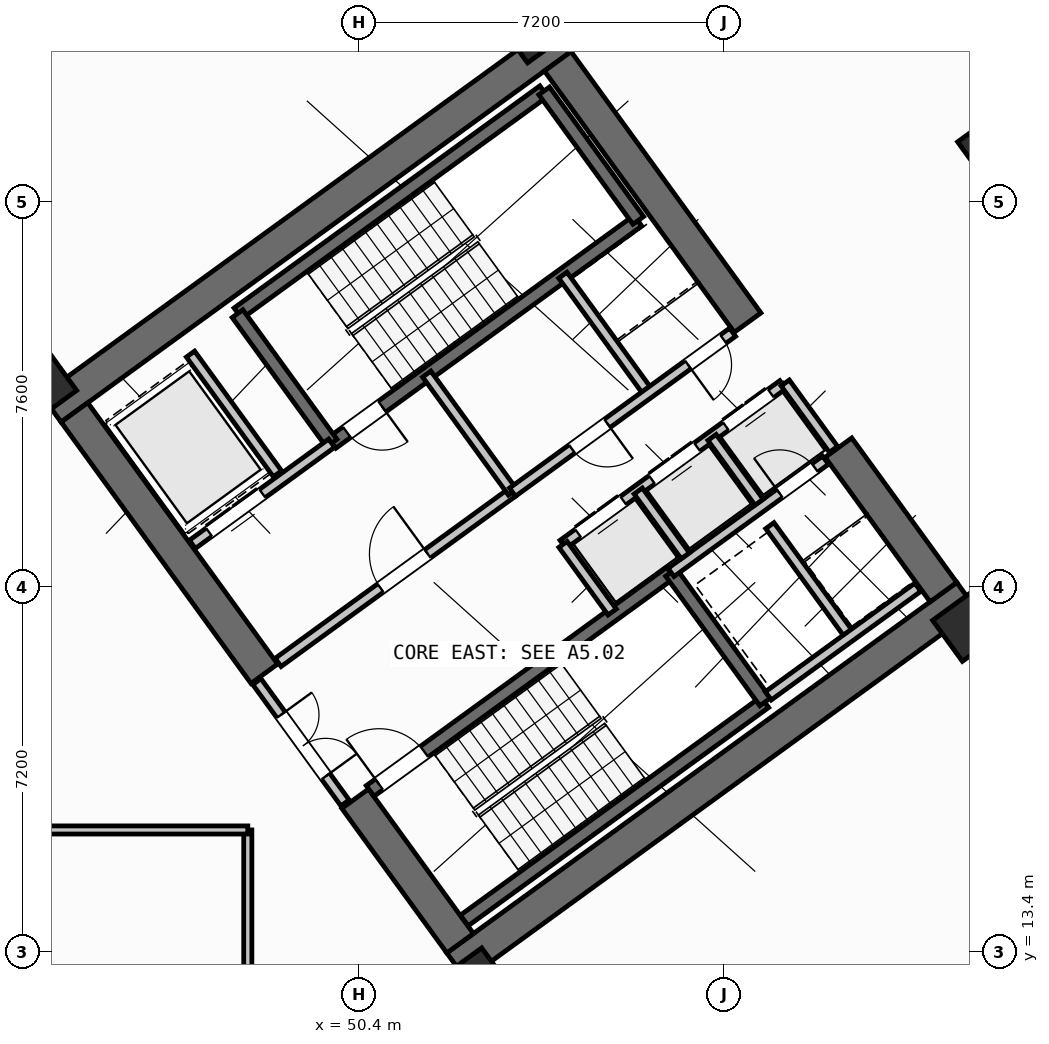
"""IFC4 building model, lengths in metres.
Left out: names, types, materials, properties, quantities, classifications, styles, units other than length and angle.
Written with IfcOpenShell. Run it as: python <this file> out.ifc"""

import sys

from ifc_helpers import new_model, si_unit, direction, frame, frame_2d, origin, origin_2d, place, context, subcontext, project, spatial, rectangle, hollow_rectangle, extrude, source, transform, mapped, element, fill, save


model = new_model("IFC4")
c1 = context("Model", 3, precision=1e-05, world=origin(), true_north=direction((0.0, 1.0)))
c2 = subcontext(c1, "Body", "Model", "MODEL_VIEW")
j1 = project(units=[si_unit("LENGTHUNIT", "METRE"), si_unit("PLANEANGLEUNIT", "RADIAN")], contexts=[c1])
p1 = place(None, origin())
s1 = spatial("IfcSite", under=j1, at=p1, CompositionType="ELEMENT")
p2 = place(p1, origin())
s2 = spatial("IfcBuilding", under=s1, at=p2, CompositionType="ELEMENT")
p3 = place(p2, frame((0.0, 0.0, 10.2)))
s3 = spatial("IfcBuildingStorey", under=s2, at=p3, CompositionType="ELEMENT", Elevation=10.2)
p4 = place(p3, frame((52.318, 13.11, 0.0), z_axis=(0.0, 0.0, 1.0), x_axis=(0.809019445368, 0.587781878776, 0.0)))
e1 = element("IfcWall", 1, at=p4, inside=s3, PredefinedType="SHEAR", context=c2, shape_type="SweptSolid", body=[
    extrude(rectangle(XDim=12.44, YDim=0.65, at=frame_2d((6.22, 0.0))), origin(), (0.0, 0.0, 1.0), 3.85),
])
p5 = place(p3, frame((44.325, 24.113, 0.0), z_axis=(0.0, 0.0, 1.0), x_axis=(0.809012664862, 0.58779121131, 0.0)))
e2 = element("IfcWall", 2, at=p5, inside=s3, PredefinedType="SHEAR", context=c2, shape_type="SweptSolid", body=[
    extrude(rectangle(XDim=12.44, YDim=0.65, at=frame_2d((6.22, 0.0))), origin(), (0.0, 0.0, 1.0), 3.85),
])
p6 = place(p3, frame((52.39, 13.564, 0.0), z_axis=(0.0, 0.0, 1.0), x_axis=(-0.58779688989, 0.809008539037, 0.0)))
e3 = element("IfcWall", 3, at=p6, inside=s3, PredefinedType="SHEAR", context=c2, shape_type="SweptSolid", body=[
    extrude(rectangle(XDim=3.525, YDim=0.65, at=frame_2d((1.763, 0.0))), origin(), (0.0, 0.0, 1.0), 3.85),
])
p7 = place(p3, frame((48.526, 18.884, 0.0), z_axis=(0.0, 0.0, 1.0), x_axis=(-0.58777996584, 0.809020835181, 0.0)))
e4 = element("IfcWall", 4, at=p7, inside=s3, PredefinedType="SHEAR", context=c2, shape_type="SweptSolid", body=[
    extrude(rectangle(XDim=6.375, YDim=0.65, at=frame_2d((3.188, 0.0))), origin(), (0.0, 0.0, 1.0), 3.85),
])
p8 = place(p3, frame((61.929, 20.494, 0.0), z_axis=(0.0, 0.0, 1.0), x_axis=(-0.58782982593, 0.808984607855, 0.0)))
e5 = element("IfcWall", 5, at=p8, inside=s3, PredefinedType="SHEAR", context=c2, shape_type="SweptSolid", body=[
    extrude(rectangle(XDim=3.525, YDim=0.65, at=frame_2d((1.762, 0.0))), origin(), (0.0, 0.0, 1.0), 3.85),
])
p9 = place(p3, frame((58.064, 25.813, 0.0), z_axis=(0.0, 0.0, 1.0), x_axis=(-0.58777996584, 0.809020835181, 0.0)))
e6 = element("IfcWall", 6, at=p9, inside=s3, PredefinedType="SHEAR", context=c2, shape_type="SweptSolid", body=[
    extrude(rectangle(XDim=6.375, YDim=0.65, at=frame_2d((3.188, 0.0))), origin(), (0.0, 0.0, 1.0), 3.85),
])
m1 = source(origin(), c2, "Body", "SweptSolid", [
    extrude(hollow_rectangle(XDim=1.1, YDim=1.1, WallThickness=0.04, at=origin_2d()), origin(), (0.0, 0.0, 1.0), 4.2),
])
p10 = place(p3, frame((62.977, 29.259, 0.0), z_axis=(0.0, 0.0, 1.0), x_axis=(0.809016994375, 0.587785252292, 0.0)))
e7 = element("IfcColumn", 7, at=p10, inside=s3, PredefinedType="COLUMN", context=c2, shape_type="MappedRepresentation", body=[
    mapped(m1, transform((0.0, 0.0, 0.0), scale=1.0)),
])
m2 = source(origin(), c2, "Body", "SweptSolid", [
    extrude(hollow_rectangle(XDim=1.0, YDim=1.0, WallThickness=0.04, at=origin_2d()), origin(), (0.0, 0.0, 1.0), 4.2),
])
for number, where, z_axis, x_axis in (
    (8, (52.705, 12.773, 0.0), (0.0, 0.0, 1.0), (0.809, 0.588, 0.0)),
    (9, (44.124, 24.585, 0.0), (0.0, 0.0, 1.0), (0.809, 0.588, 0.0)),
    (10, (62.414, 19.827, 0.0), (0.0, 0.0, 1.0), (0.809, 0.588, 0.0)),
    (11, (53.832, 31.638, 0.0), (0.0, 0.0, 1.0), (0.809, 0.588, 0.0)),
):
    element("IfcColumn", number, at=place(p3, frame(where, z_axis=z_axis, x_axis=x_axis)), inside=s3, PredefinedType="COLUMN", context=c2, shape_type="MappedRepresentation", body=[
        mapped(m2, transform((0.0, 0.0, 0.0), scale=1.0)),
    ])
p11 = place(p3, frame((48.006, 25.996, 0.0), z_axis=(0.0, 0.0, 1.0), x_axis=(0.80901903764, 0.587782439969, 0.0)))
e12 = element("IfcWall", 12, at=p11, inside=s3, PredefinedType="SHEAR", context=c2, shape_type="SweptSolid", body=[
    extrude(rectangle(XDim=7.46, YDim=0.26, at=frame_2d((3.73, 0.0))), origin(), (0.0, 0.0, 1.0), 3.85),
])
p12 = place(p3, frame((49.863, 23.44, 0.0), z_axis=(0.0, 0.0, 1.0), x_axis=(0.809003474932, 0.587803859759, 0.0)))
e13 = element("IfcWall", 13, at=p12, inside=s3, PredefinedType="SHEAR", context=c2, shape_type="SweptSolid", body=[
    extrude(rectangle(XDim=7.46, YDim=0.26, at=frame_2d((3.73, 0.0))), origin(), (0.0, 0.0, 1.0), 3.85),
])
p13 = place(p12, frame((0.36, 0.0, 0.0)))
e14 = element("IfcOpeningElement", 14, at=p13, cuts=e13, PredefinedType="OPENING", context=c2, shape_type="SweptSolid", body=[
    extrude(rectangle(XDim=0.86, YDim=2.05, at=frame_2d((0.43, 1.025))), frame((0.0, 0.14, 0.0), z_axis=(0.0, -1.0, 0.0), x_axis=(1.0, 0.0, 0.0)), (0.0, 0.0, 1.0), 0.28),
])
p14 = place(p3, frame((49.855, 23.434, 0.0), z_axis=(0.0, 0.0, 1.0), x_axis=(-0.58776738483, 0.809029975545, 0.0)))
e15 = element("IfcWall", 15, at=p14, inside=s3, PredefinedType="SHEAR", context=c2, shape_type="SweptSolid", body=[
    extrude(rectangle(XDim=3.16, YDim=0.26, at=frame_2d((1.58, 0.0))), origin(), (0.0, 0.0, 1.0), 3.85),
])
p15 = place(p3, frame((55.906, 27.831, 0.0), z_axis=(0.0, 0.0, 1.0), x_axis=(-0.587804123638, 0.809003283204, 0.0)))
e16 = element("IfcWall", 16, at=p15, inside=s3, PredefinedType="SHEAR", context=c2, shape_type="SweptSolid", body=[
    extrude(rectangle(XDim=3.16, YDim=0.26, at=frame_2d((1.58, 0.0))), origin(), (0.0, 0.0, 1.0), 3.85),
])
p16 = place(p3, frame((52.472, 14.013, 0.0), z_axis=(0.0, 0.0, 1.0), x_axis=(0.809028366311, 0.587769599847, 0.0)))
e17 = element("IfcWall", 17, at=p16, inside=s3, PredefinedType="SHEAR", context=c2, shape_type="SweptSolid", body=[
    extrude(rectangle(XDim=7.33, YDim=0.26, at=frame_2d((3.665, 0.0))), origin(), (0.0, 0.0, 1.0), 3.85),
])
p17 = place(p3, frame((50.615, 16.57, 0.0), z_axis=(0.0, 0.0, 1.0), x_axis=(0.809028366311, 0.587769599847, 0.0)))
e18 = element("IfcWall", 18, at=p17, inside=s3, PredefinedType="SHEAR", context=c2, shape_type="SweptSolid", body=[
    extrude(rectangle(XDim=7.33, YDim=0.26, at=frame_2d((3.665, 0.0))), origin(), (0.0, 0.0, 1.0), 3.85),
])
p18 = place(p17, frame((0.22, 0.0, 0.0)))
e19 = element("IfcOpeningElement", 19, at=p18, cuts=e18, PredefinedType="OPENING", context=c2, shape_type="SweptSolid", body=[
    extrude(rectangle(XDim=1.1, YDim=2.1, at=frame_2d((0.55, 1.05))), frame((0.0, 0.14, 0.0), z_axis=(0.0, -1.0, 0.0), x_axis=(1.0, 0.0, 0.0)), (0.0, 0.0, 1.0), 0.28),
])
p19 = place(p3, frame((58.41, 18.327, 0.0), z_axis=(0.0, 0.0, 1.0), x_axis=(-0.58776738483, 0.809029975545, 0.0)))
e20 = element("IfcWall", 20, at=p19, inside=s3, PredefinedType="SHEAR", context=c2, shape_type="SweptSolid", body=[
    extrude(rectangle(XDim=3.16, YDim=0.26, at=frame_2d((1.58, 0.0))), origin(), (0.0, 0.0, 1.0), 3.85),
])
p20 = place(p3, frame((47.106, 21.437, 0.0), z_axis=(0.0, 0.0, 1.0), x_axis=(0.809012514015, 0.58779141893, 0.0)))
e21 = element("IfcWall", 21, at=p20, inside=s3, PredefinedType="STANDARD", context=c2, shape_type="SweptSolid", body=[
    extrude(rectangle(XDim=3.398, YDim=0.2, at=frame_2d((1.699, 0.0))), origin(), (0.0, 0.0, 1.0), 3.84),
])
p21 = place(p20, frame((0.408, 0.0, 0.0)))
e22 = element("IfcOpeningElement", 22, at=p21, cuts=e21, PredefinedType="OPENING", context=c2, shape_type="SweptSolid", body=[
    extrude(rectangle(XDim=1.3, YDim=2.2, at=frame_2d((0.65, 1.1))), frame((0.0, 0.11, 0.0), z_axis=(0.0, -1.0, 0.0), x_axis=(1.0, 0.0, 0.0)), (0.0, 0.0, 1.0), 0.22),
])
p22 = place(p3, frame((48.799, 19.107, 0.0), z_axis=(0.0, 0.0, 1.0), x_axis=(0.809012959416, 0.587790805897, 0.0)))
e23 = element("IfcWall", 23, at=p22, inside=s3, PredefinedType="STANDARD", context=c2, shape_type="SweptSolid", body=[
    extrude(rectangle(XDim=5.718, YDim=0.2, at=frame_2d((2.859, 0.0))), origin(), (0.0, 0.0, 1.0), 3.84),
])
p23 = place(p22, frame((2.498, 0.0, 0.0)))
e24 = element("IfcOpeningElement", 24, at=p23, cuts=e23, PredefinedType="OPENING", context=c2, shape_type="SweptSolid", body=[
    extrude(rectangle(XDim=1.15, YDim=2.1, at=frame_2d((0.575, 1.05))), frame((0.0, 0.11, 0.0), z_axis=(0.0, -1.0, 0.0), x_axis=(1.0, 0.0, 0.0)), (0.0, 0.0, 1.0), 0.22),
])
p24 = place(p3, frame((56.553, 20.884, 0.0), z_axis=(0.0, 0.0, 1.0), x_axis=(0.809035789462, 0.587759382205, 0.0)))
e25 = element("IfcWall", 25, at=p24, inside=s3, PredefinedType="STANDARD", context=c2, shape_type="SweptSolid", body=[
    extrude(rectangle(XDim=3.768, YDim=0.2, at=frame_2d((1.884, 0.0))), origin(), (0.0, 0.0, 1.0), 3.84),
])
p25 = place(p24, frame((2.65, 0.0, 0.0)))
e26 = element("IfcOpeningElement", 26, at=p25, cuts=e25, PredefinedType="OPENING", context=c2, shape_type="SweptSolid", body=[
    extrude(rectangle(XDim=0.86, YDim=2.05, at=frame_2d((0.43, 1.025))), frame((0.0, 0.11, 0.0), z_axis=(0.0, -1.0, 0.0), x_axis=(1.0, 0.0, 0.0)), (0.0, 0.0, 1.0), 0.22),
])
p26 = place(p3, frame((54.421, 21.436, 0.0), z_axis=(0.0, 0.0, 1.0), x_axis=(0.809013710463, 0.587789772183, 0.0)))
e27 = element("IfcWall", 27, at=p26, inside=s3, PredefinedType="STANDARD", context=c2, shape_type="SweptSolid", body=[
    extrude(rectangle(XDim=5.36, YDim=0.2, at=frame_2d((2.68, 0.0))), origin(), (0.0, 0.0, 1.0), 3.84),
])
p27 = place(p26, frame((0.37, 0.0, 0.0)))
e28 = element("IfcOpeningElement", 28, at=p27, cuts=e27, PredefinedType="OPENING", context=c2, shape_type="SweptSolid", body=[
    extrude(rectangle(XDim=1.1, YDim=2.15, at=frame_2d((0.55, 1.075))), frame((0.0, 0.11, 0.0), z_axis=(0.0, -1.0, 0.0), x_axis=(1.0, 0.0, 0.0)), (0.0, 0.0, 1.0), 0.22),
])
p28 = place(p26, frame((2.17, 0.0, 0.0)))
e29 = element("IfcOpeningElement", 29, at=p28, cuts=e27, PredefinedType="OPENING", context=c2, shape_type="SweptSolid", body=[
    extrude(rectangle(XDim=1.1, YDim=2.15, at=frame_2d((0.55, 1.075))), frame((0.0, 0.11, 0.0), z_axis=(0.0, -1.0, 0.0), x_axis=(1.0, 0.0, 0.0)), (0.0, 0.0, 1.0), 0.22),
])
p29 = place(p26, frame((3.97, 0.0, 0.0)))
e30 = element("IfcOpeningElement", 30, at=p29, cuts=e27, PredefinedType="OPENING", context=c2, shape_type="SweptSolid", body=[
    extrude(rectangle(XDim=1.1, YDim=2.15, at=frame_2d((0.55, 1.075))), frame((0.0, 0.11, 0.0), z_axis=(0.0, -1.0, 0.0), x_axis=(1.0, 0.0, 0.0)), (0.0, 0.0, 1.0), 0.22),
])
p30 = place(p3, frame((55.391, 20.102, 0.0), z_axis=(0.0, 0.0, 1.0), x_axis=(-0.58778447739, 0.809017557374, 0.0)))
e31 = element("IfcWall", 31, at=p30, inside=s3, PredefinedType="STANDARD", context=c2, shape_type="SweptSolid", body=[
    extrude(rectangle(XDim=1.65, YDim=0.2, at=frame_2d((0.825, 0.0))), origin(), (0.0, 0.0, 1.0), 3.84),
])
p31 = place(p3, frame((48.786, 22.83, 0.0), z_axis=(0.0, 0.0, 1.0), x_axis=(-0.587783856777, 0.809018008275, 0.0)))
e32 = element("IfcWall", 32, at=p31, inside=s3, PredefinedType="STANDARD", context=c2, shape_type="SweptSolid", body=[
    extrude(rectangle(XDim=2.92, YDim=0.2, at=frame_2d((1.46, 0.0))), origin(), (0.0, 0.0, 1.0), 3.84),
])
p32 = place(p3, frame((56.834, 21.212, 0.0), z_axis=(0.0, 0.0, 1.0), x_axis=(-0.58776738483, 0.809029975545, 0.0)))
e33 = element("IfcWall", 33, at=p32, inside=s3, PredefinedType="STANDARD", context=c2, shape_type="SweptSolid", body=[
    extrude(rectangle(XDim=1.58, YDim=0.2, at=frame_2d((0.79, 0.0))), origin(), (0.0, 0.0, 1.0), 3.84),
])
p33 = place(p3, frame((58.29, 22.27, 0.0), z_axis=(0.0, 0.0, 1.0), x_axis=(-0.587840865826, 0.808976585857, 0.0)))
e34 = element("IfcWall", 34, at=p33, inside=s3, PredefinedType="STANDARD", context=c2, shape_type="SweptSolid", body=[
    extrude(rectangle(XDim=1.58, YDim=0.2, at=frame_2d((0.79, 0.0))), origin(), (0.0, 0.0, 1.0), 3.84),
])
p34 = place(p3, frame((59.758, 23.312, 0.0), z_axis=(0.0, 0.0, 1.0), x_axis=(-0.587875962906, 0.808951081486, 0.0)))
e35 = element("IfcWall", 35, at=p34, inside=s3, PredefinedType="STANDARD", context=c2, shape_type="SweptSolid", body=[
    extrude(rectangle(XDim=1.62, YDim=0.2, at=frame_2d((0.81, 0.0))), origin(), (0.0, 0.0, 1.0), 3.84),
])
p35 = place(p3, frame((60.067, 19.655, 0.0), z_axis=(0.0, 0.0, 1.0), x_axis=(-0.587800520745, 0.809005900975, 0.0)))
e36 = element("IfcWall", 36, at=p35, inside=s3, PredefinedType="STANDARD", context=c2, shape_type="SweptSolid", body=[
    extrude(rectangle(XDim=2.66, YDim=0.2, at=frame_2d((1.33, 0.0))), origin(), (0.0, 0.0, 1.0), 3.84),
])
p36 = place(p3, frame((58.472, 18.447, 0.0), z_axis=(0.0, 0.0, 1.0), x_axis=(0.809022487728, 0.587777691266, 0.0)))
e37 = element("IfcWall", 37, at=p36, inside=s3, PredefinedType="STANDARD", context=c2, shape_type="SweptSolid", body=[
    extrude(rectangle(XDim=3.648, YDim=0.2, at=frame_2d((1.824, 0.0))), origin(), (0.0, 0.0, 1.0), 3.84),
])
p37 = place(p3, frame((53.425, 22.468, 0.0), z_axis=(0.0, 0.0, 1.0), x_axis=(-0.5877230039, 0.809062216821, 0.0)))
e38 = element("IfcWall", 38, at=p37, inside=s3, PredefinedType="STANDARD", context=c2, shape_type="SweptSolid", body=[
    extrude(rectangle(XDim=2.88, YDim=0.2, at=frame_2d((1.44, 0.0))), origin(), (0.0, 0.0, 1.0), 3.84),
])
p38 = place(p3, frame((56.111, 24.419, 0.0), z_axis=(0.0, 0.0, 1.0), x_axis=(-0.58777848983, 0.809021907548, 0.0)))
e39 = element("IfcWall", 39, at=p38, inside=s3, PredefinedType="STANDARD", context=c2, shape_type="SweptSolid", body=[
    extrude(rectangle(XDim=2.88, YDim=0.2, at=frame_2d((1.44, 0.0))), origin(), (0.0, 0.0, 1.0), 3.84),
])
p39 = place(p3, frame((53.425, 22.468, 0.0), z_axis=(0.0, 0.0, 1.0), x_axis=(0.80902705128, 0.587771409902, 0.0)))
e40 = element("IfcWall", 40, at=p39, inside=s3, PredefinedType="STANDARD", context=c2, shape_type="SweptSolid", body=[
    extrude(rectangle(XDim=5.368, YDim=0.2, at=frame_2d((2.684, 0.0))), origin(), (0.0, 0.0, 1.0), 3.84),
])
p40 = place(p39, frame((4.28, 0.0, 0.0)))
e41 = element("IfcOpeningElement", 41, at=p40, cuts=e40, PredefinedType="OPENING", context=c2, shape_type="SweptSolid", body=[
    extrude(rectangle(XDim=0.86, YDim=2.05, at=frame_2d((0.43, 1.025))), frame((0.0, 0.11, 0.0), z_axis=(0.0, -1.0, 0.0), x_axis=(1.0, 0.0, 0.0)), (0.0, 0.0, 1.0), 0.22),
])
p41 = place(p39, frame((1.45, 0.0, 0.0)))
e42 = element("IfcOpeningElement", 42, at=p41, cuts=e40, PredefinedType="OPENING", context=c2, shape_type="SweptSolid", body=[
    extrude(rectangle(XDim=0.86, YDim=2.05, at=frame_2d((0.43, 1.025))), frame((0.0, 0.11, 0.0), z_axis=(0.0, -1.0, 0.0), x_axis=(1.0, 0.0, 0.0)), (0.0, 0.0, 1.0), 0.22),
])
p42 = place(p3, frame((50.119, 16.333, 0.0), z_axis=(0.0, 0.0, 1.0), x_axis=(-0.587749856981, 0.809042709391, 0.0)))
e43 = element("IfcWall", 43, at=p42, inside=s3, PredefinedType="STANDARD", context=c2, shape_type="SweptSolid", body=[
    extrude(rectangle(XDim=2.96, YDim=0.2, at=frame_2d((1.48, 0.0))), origin(), (0.0, 0.0, 1.0), 3.84),
])
p43 = place(p42, frame((0.65, 0.0, 0.0)))
e44 = element("IfcOpeningElement", 44, at=p43, cuts=e43, PredefinedType="OPENING", context=c2, shape_type="SweptSolid", body=[
    extrude(rectangle(XDim=1.5, YDim=2.15, at=frame_2d((0.75, 1.075))), frame((0.0, 0.11, 0.0), z_axis=(0.0, -1.0, 0.0), x_axis=(1.0, 0.0, 0.0)), (0.0, 0.0, 1.0), 0.22),
])
p44 = place(p3, frame((48.2, 10.58, 0.0), z_axis=(0.0, 0.0, 1.0), x_axis=(0.0, 1.0, 0.0)))
e45 = element("IfcWall", 45, at=p44, inside=s3, PredefinedType="PARTITIONING", context=c2, shape_type="SweptSolid", body=[
    extrude(rectangle(XDim=5.22, YDim=0.16, at=frame_2d((2.61, 0.0))), origin(), (0.0, 0.0, 1.0), 3.84),
])
p45 = place(p3, frame((35.534, 15.8, 0.0), z_axis=(0.0, 0.0, 1.0), x_axis=(1.0, 0.0, 0.0)))
e46 = element("IfcWall", 46, at=p45, inside=s3, PredefinedType="PARTITIONING", context=c2, shape_type="SweptSolid", body=[
    extrude(rectangle(XDim=12.666, YDim=0.16, at=frame_2d((6.333, 0.0))), origin(), (0.0, 0.0, 1.0), 3.84),
])
m3 = source(origin(), c2, "Body", "SweptSolid", [
    extrude(rectangle(XDim=0.86, YDim=2.05, at=frame_2d((0.43, 1.025))), frame((0.0, 0.025, 0.0), z_axis=(0.0, -1.0, 0.0), x_axis=(1.0, 0.0, 0.0)), (0.0, 0.0, 1.0), 0.05),
])
p46 = place(p13, frame((0.86, 0.0, 0.0), z_axis=(0.0, 0.0, 1.0), x_axis=(-1.0, 0.0, 0.0)))
e47 = element("IfcDoor", 47, at=p46, inside=s3, OperationType="SINGLE_SWING_LEFT", PredefinedType="DOOR", context=c2, shape_type="MappedRepresentation", body=[
    mapped(m3, transform((0.0, 0.0, 0.0), scale=1.0)),
])
fill(e14, e47)
m4 = source(origin(), c2, "Body", "SweptSolid", [
    extrude(rectangle(XDim=1.1, YDim=2.1, at=frame_2d((0.55, 1.05))), frame((0.0, 0.025, 0.0), z_axis=(0.0, -1.0, 0.0), x_axis=(1.0, 0.0, 0.0)), (0.0, 0.0, 1.0), 0.05),
])
p47 = place(p18, origin())
e48 = element("IfcDoor", 48, at=p47, inside=s3, OperationType="SINGLE_SWING_LEFT", PredefinedType="DOOR", context=c2, shape_type="MappedRepresentation", body=[
    mapped(m4, transform((0.0, 0.0, 0.0), scale=1.0)),
])
fill(e19, e48)
m5 = source(origin(), c2, "Body", "SweptSolid", [
    extrude(rectangle(XDim=1.15, YDim=2.1, at=frame_2d((0.575, 1.05))), frame((0.0, 0.025, 0.0), z_axis=(0.0, -1.0, 0.0), x_axis=(1.0, 0.0, 0.0)), (0.0, 0.0, 1.0), 0.05),
])
p48 = place(p23, origin())
e49 = element("IfcDoor", 49, at=p48, inside=s3, OperationType="SINGLE_SWING_RIGHT", PredefinedType="DOOR", context=c2, shape_type="MappedRepresentation", body=[
    mapped(m5, transform((0.0, 0.0, 0.0), scale=1.0)),
])
fill(e24, e49)
m6 = source(origin(), c2, "Body", "SweptSolid", [
    extrude(rectangle(XDim=1.3, YDim=2.2, at=frame_2d((0.65, 1.1))), frame((0.0, 0.025, 0.0), z_axis=(0.0, -1.0, 0.0), x_axis=(1.0, 0.0, 0.0)), (0.0, 0.0, 1.0), 0.05),
])
p49 = place(p21, origin())
e50 = element("IfcDoor", 50, at=p49, inside=s3, OperationType="DOUBLE_DOOR_SLIDING", PredefinedType="DOOR", context=c2, shape_type="MappedRepresentation", body=[
    mapped(m6, transform((0.0, 0.0, 0.0), scale=1.0)),
])
fill(e22, e50)
m7 = source(origin(), c2, "Body", "SweptSolid", [
    extrude(rectangle(XDim=1.1, YDim=2.15, at=frame_2d((0.55, 1.075))), frame((0.0, 0.025, 0.0), z_axis=(0.0, -1.0, 0.0), x_axis=(1.0, 0.0, 0.0)), (0.0, 0.0, 1.0), 0.05),
])
p50 = place(p27, origin())
e51 = element("IfcDoor", 51, at=p50, inside=s3, OperationType="DOUBLE_DOOR_SLIDING", PredefinedType="DOOR", context=c2, shape_type="MappedRepresentation", body=[
    mapped(m7, transform((0.0, 0.0, 0.0), scale=1.0)),
])
fill(e28, e51)
p51 = place(p28, origin())
e52 = element("IfcDoor", 52, at=p51, inside=s3, OperationType="DOUBLE_DOOR_SLIDING", PredefinedType="DOOR", context=c2, shape_type="MappedRepresentation", body=[
    mapped(m7, transform((0.0, 0.0, 0.0), scale=1.0)),
])
fill(e29, e52)
p52 = place(p29, origin())
e53 = element("IfcDoor", 53, at=p52, inside=s3, OperationType="DOUBLE_DOOR_SLIDING", PredefinedType="DOOR", context=c2, shape_type="MappedRepresentation", body=[
    mapped(m7, transform((0.0, 0.0, 0.0), scale=1.0)),
])
fill(e30, e53)
p53 = place(p25, origin())
e54 = element("IfcDoor", 54, at=p53, inside=s3, OperationType="SINGLE_SWING_LEFT", PredefinedType="DOOR", context=c2, shape_type="MappedRepresentation", body=[
    mapped(m3, transform((0.0, 0.0, 0.0), scale=1.0)),
])
fill(e26, e54)
p54 = place(p40, frame((0.86, 0.0, 0.0), z_axis=(0.0, 0.0, 1.0), x_axis=(-1.0, 0.0, 0.0)))
e55 = element("IfcDoor", 55, at=p54, inside=s3, OperationType="SINGLE_SWING_RIGHT", PredefinedType="DOOR", context=c2, shape_type="MappedRepresentation", body=[
    mapped(m3, transform((0.0, 0.0, 0.0), scale=1.0)),
])
fill(e41, e55)
p55 = place(p41, frame((0.86, 0.0, 0.0), z_axis=(0.0, 0.0, 1.0), x_axis=(-1.0, 0.0, 0.0)))
e56 = element("IfcDoor", 56, at=p55, inside=s3, OperationType="SINGLE_SWING_LEFT", PredefinedType="DOOR", context=c2, shape_type="MappedRepresentation", body=[
    mapped(m3, transform((0.0, 0.0, 0.0), scale=1.0)),
])
fill(e42, e56)
m8 = source(origin(), c2, "Body", "SweptSolid", [
    extrude(rectangle(XDim=1.5, YDim=2.15, at=frame_2d((0.75, 1.075))), frame((0.0, 0.025, 0.0), z_axis=(0.0, -1.0, 0.0), x_axis=(1.0, 0.0, 0.0)), (0.0, 0.0, 1.0), 0.05),
])
p56 = place(p43, frame((1.5, 0.0, 0.0), z_axis=(0.0, 0.0, 1.0), x_axis=(-1.0, 0.0, 0.0)))
e57 = element("IfcDoor", 57, at=p56, inside=s3, OperationType="DOUBLE_DOOR_SINGLE_SWING", PredefinedType="DOOR", context=c2, shape_type="MappedRepresentation", body=[
    mapped(m8, transform((0.0, 0.0, 0.0), scale=1.0)),
])
fill(e44, e57)
save(model, sys.argv[1])
